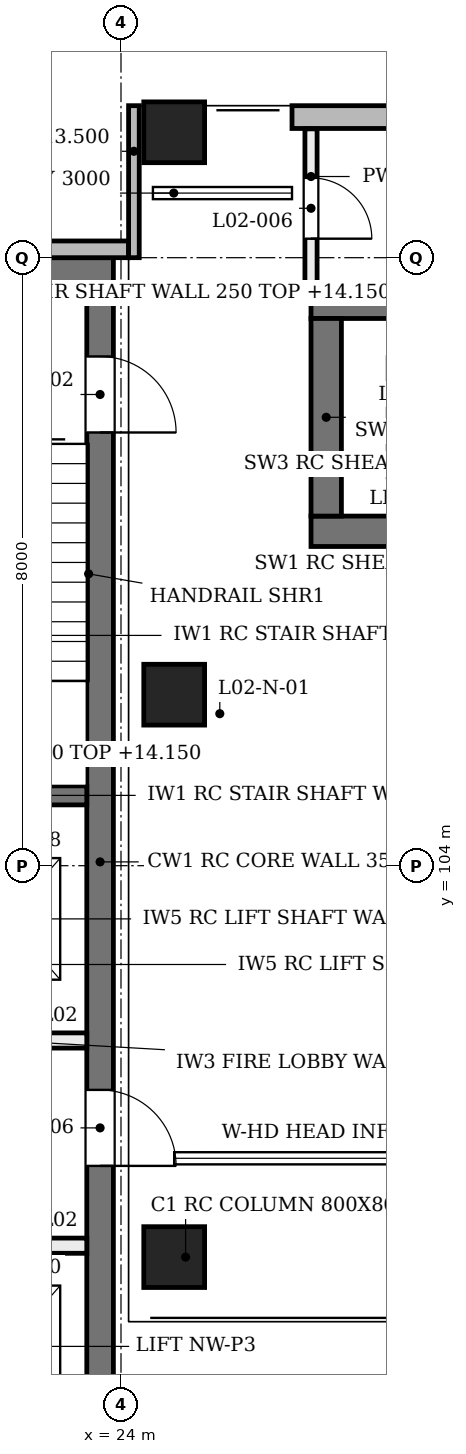
"""IFC4 building model, lengths in metres.
Left out: names, types, materials, properties, quantities, classifications, styles, units other than length and angle.
Written with IfcOpenShell. Run it as: python <this file> out.ifc"""

import sys

from ifc_helpers import new_model, si_unit, direction, frame, frame_2d, origin, origin_2d, place, context, subcontext, project, spatial, rectangle, extrude, element, fill, save


model = new_model("IFC4")
c1 = context("Model", 3, precision=1e-05, world=origin(), true_north=direction((0.0, 1.0)))
c2 = subcontext(c1, "Body", "Model", "MODEL_VIEW")
j1 = project(units=[si_unit("LENGTHUNIT", "METRE"), si_unit("PLANEANGLEUNIT", "RADIAN")], contexts=[c1])
p1 = place(None, origin())
s1 = spatial("IfcSite", under=j1, at=p1, CompositionType="ELEMENT")
p2 = place(p1, origin())
s2 = spatial("IfcBuilding", under=s1, at=p2, CompositionType="ELEMENT")
p3 = place(p2, frame((0.0, 0.0, 9.6)))
s3 = spatial("IfcBuildingStorey", under=s2, at=p3, CompositionType="ELEMENT", Elevation=9.6)
p4 = place(p3, frame((26.5, 108.4, 0.0), z_axis=(0.0, 0.0, 1.0), x_axis=(1.0, 0.0, 0.0)))
e1 = element("IfcWall", 1, at=p4, inside=s3, PredefinedType="SHEAR", context=c2, shape_type="SweptSolid", body=[
    extrude(rectangle(XDim=6.5, YDim=0.4, at=frame_2d((3.25, 0.0))), origin(), (0.0, 0.0, 1.0), 4.58),
])
p5 = place(p4, frame((1.15, 0.0, 0.0)))
e2 = element("IfcOpeningElement", 2, at=p5, cuts=e1, PredefinedType="OPENING", context=c2, shape_type="SweptSolid", body=[
    extrude(rectangle(XDim=1.1, YDim=2.1, at=frame_2d((0.55, 1.05))), frame((0.0, 0.21, 0.0), z_axis=(0.0, -1.0, 0.0), x_axis=(1.0, 0.0, 0.0)), (0.0, 0.0, 1.0), 0.42),
])
p6 = place(p4, frame((3.75, 0.0, 0.0)))
e3 = element("IfcOpeningElement", 3, at=p6, cuts=e1, PredefinedType="OPENING", context=c2, shape_type="SweptSolid", body=[
    extrude(rectangle(XDim=1.1, YDim=2.1, at=frame_2d((0.55, 1.05))), frame((0.0, 0.21, 0.0), z_axis=(0.0, -1.0, 0.0), x_axis=(1.0, 0.0, 0.0)), (0.0, 0.0, 1.0), 0.42),
])
p7 = place(p3, frame((26.5, 111.4, 0.0), z_axis=(0.0, 0.0, 1.0), x_axis=(1.0, 0.0, 0.0)))
e4 = element("IfcWall", 4, at=p7, inside=s3, PredefinedType="SHEAR", context=c2, shape_type="SweptSolid", body=[
    extrude(rectangle(XDim=6.5, YDim=0.4, at=frame_2d((3.25, 0.0))), origin(), (0.0, 0.0, 1.0), 4.58),
])
p8 = place(p3, frame((26.7, 108.6, 0.0), z_axis=(0.0, 0.0, 1.0), x_axis=(0.0, 1.0, 0.0)))
e5 = element("IfcWall", 5, at=p8, inside=s3, PredefinedType="SHEAR", context=c2, shape_type="SweptSolid", body=[
    extrude(rectangle(XDim=2.6, YDim=0.4, at=frame_2d((1.3, 0.0))), origin(), (0.0, 0.0, 1.0), 4.58),
])
p9 = place(p3, frame((16.0, 111.825, 0.0), z_axis=(0.0, 0.0, 1.0), x_axis=(1.0, 0.0, 0.0)))
e6 = element("IfcWall", 6, at=p9, inside=s3, PredefinedType="SHEAR", context=c2, shape_type="SweptSolid", body=[
    extrude(rectangle(XDim=7.9, YDim=0.35, at=frame_2d((3.95, 0.0))), origin(), (0.0, 0.0, 1.0), 4.58),
])
p10 = place(p3, frame((23.725, 96.45, 0.0), z_axis=(0.0, 0.0, 1.0), x_axis=(0.0, 1.0, 0.0)))
e7 = element("IfcWall", 7, at=p10, inside=s3, PredefinedType="SHEAR", context=c2, shape_type="SweptSolid", body=[
    extrude(rectangle(XDim=15.2, YDim=0.35, at=frame_2d((7.6, 0.0))), origin(), (0.0, 0.0, 1.0), 4.58),
])
p11 = place(p10, frame((13.25, 0.0, 0.0)))
e8 = element("IfcOpeningElement", 8, at=p11, cuts=e7, PredefinedType="OPENING", context=c2, shape_type="SweptSolid", body=[
    extrude(rectangle(XDim=1.0, YDim=2.1, at=frame_2d((0.5, 1.05))), frame((0.0, 0.185, 0.0), z_axis=(0.0, -1.0, 0.0), x_axis=(1.0, 0.0, 0.0)), (0.0, 0.0, 1.0), 0.37),
])
p12 = place(p10, frame((3.6, 0.0, 0.0)))
e9 = element("IfcOpeningElement", 9, at=p12, cuts=e7, PredefinedType="OPENING", context=c2, shape_type="SweptSolid", body=[
    extrude(rectangle(XDim=1.0, YDim=2.1, at=frame_2d((0.5, 1.05))), frame((0.0, 0.185, 0.0), z_axis=(0.0, -1.0, 0.0), x_axis=(1.0, 0.0, 0.0)), (0.0, 0.0, 1.0), 0.37),
])
for number, where, z_axis, x_axis in (
    (10, (24.7, 98.6, 0.0), (0.0, 0.204, 0.979), (-1.0, 0.0, 0.0)),
    (11, (24.7, 106.0, 0.0), (0.0, 0.204, 0.979), (-1.0, 0.0, 0.0)),
    (12, (24.7, 113.4, 0.0), (0.0, 0.204, 0.979), (-1.0, 0.0, 0.0)),
):
    element("IfcColumn", number, at=place(p3, frame(where, z_axis=z_axis, x_axis=x_axis)), inside=s3, PredefinedType="COLUMN", context=c2, shape_type="SweptSolid", body=[
        extrude(rectangle(XDim=0.8, YDim=0.8, at=origin_2d()), origin(), (0.0, 0.0, 1.0), 4.903),
    ])
p13 = place(p3, frame((26.25, 113.85, 0.0), z_axis=(0.0, 0.0, 1.0), x_axis=(1.0, 0.0, 0.0)))
e13 = element("IfcWall", 13, at=p13, inside=s3, PredefinedType="SOLIDWALL", context=c2, shape_type="SweptSolid", body=[
    extrude(rectangle(XDim=51.5, YDim=0.3, at=frame_2d((25.75, 0.0))), origin(), (0.0, 0.0, 1.0), 3.9),
])
p14 = place(p3, frame((24.9, 100.15, 4.1), z_axis=(0.0, 0.0, 1.0), x_axis=(1.0, 0.0, 0.0)))
e14 = element("IfcWall", 14, at=p14, inside=s3, PredefinedType="SOLIDWALL", context=c2, shape_type="SweptSolid", body=[
    extrude(rectangle(XDim=6.9, YDim=0.15, at=frame_2d((3.45, 0.0))), origin(), (0.0, 0.0, 1.0), 0.48),
])
p15 = place(p3, frame((15.9, 112.11, 0.0), z_axis=(0.0, 0.0, 1.0), x_axis=(1.0, 0.0, 0.0)))
e15 = element("IfcWall", 15, at=p15, inside=s3, PredefinedType="SOLIDWALL", context=c2, shape_type="SweptSolid", body=[
    extrude(rectangle(XDim=8.2, YDim=0.22, at=frame_2d((4.1, 0.0))), origin(), (0.0, 0.0, 1.0), 3.9),
])
p16 = place(p15, frame((1.108, 0.0, 0.9)))
e16 = element("IfcOpeningElement", 16, at=p16, cuts=e15, PredefinedType="OPENING", context=c2, shape_type="SweptSolid", body=[
    extrude(rectangle(XDim=0.45, YDim=2.6, at=frame_2d((0.225, 1.3))), frame((0.0, 0.12, 0.0), z_axis=(0.0, -1.0, 0.0), x_axis=(1.0, 0.0, 0.0)), (0.0, 0.0, 1.0), 0.24),
])
p17 = place(p15, frame((3.775, 0.0, 0.9)))
e17 = element("IfcOpeningElement", 17, at=p17, cuts=e15, PredefinedType="OPENING", context=c2, shape_type="SweptSolid", body=[
    extrude(rectangle(XDim=0.45, YDim=2.6, at=frame_2d((0.225, 1.3))), frame((0.0, 0.12, 0.0), z_axis=(0.0, -1.0, 0.0), x_axis=(1.0, 0.0, 0.0)), (0.0, 0.0, 1.0), 0.24),
])
p18 = place(p15, frame((6.442, 0.0, 0.9)))
e18 = element("IfcOpeningElement", 18, at=p18, cuts=e15, PredefinedType="OPENING", context=c2, shape_type="SweptSolid", body=[
    extrude(rectangle(XDim=0.45, YDim=2.6, at=frame_2d((0.225, 1.3))), frame((0.0, 0.12, 0.0), z_axis=(0.0, -1.0, 0.0), x_axis=(1.0, 0.0, 0.0)), (0.0, 0.0, 1.0), 0.24),
])
p19 = place(p3, frame((24.17, 112.0, 0.0), z_axis=(0.0, 0.0, 1.0), x_axis=(0.0, 1.0, 0.0)))
e19 = element("IfcWall", 19, at=p19, inside=s3, PredefinedType="SOLIDWALL", context=c2, shape_type="SweptSolid", body=[
    extrude(rectangle(XDim=2.0, YDim=0.14, at=frame_2d((1.0, 0.0))), origin(), (0.0, 0.0, 1.0), 3.9),
])
p20 = place(p3, frame((20.45, 104.925, 0.0), z_axis=(0.0, 0.0, 1.0), x_axis=(1.0, 0.0, 0.0)))
e20 = element("IfcWall", 20, at=p20, inside=s3, PredefinedType="SOLIDWALL", context=c2, shape_type="SweptSolid", body=[
    extrude(rectangle(XDim=3.1, YDim=0.25, at=frame_2d((1.55, 0.0))), origin(), (0.0, 0.0, 1.0), 4.55),
])
p21 = place(p3, frame((16.35, 101.7, 0.0), z_axis=(0.0, 0.0, 1.0), x_axis=(1.0, 0.0, 0.0)))
e21 = element("IfcWall", 21, at=p21, inside=s3, PredefinedType="SOLIDWALL", context=c2, shape_type="SweptSolid", body=[
    extrude(rectangle(XDim=7.2, YDim=0.2, at=frame_2d((3.6, 0.0))), origin(), (0.0, 0.0, 1.0), 4.55),
])
p22 = place(p21, frame((0.5, 0.0, 0.0)))
e22 = element("IfcOpeningElement", 22, at=p22, cuts=e21, PredefinedType="OPENING", context=c2, shape_type="SweptSolid", body=[
    extrude(rectangle(XDim=1.1, YDim=2.1, at=frame_2d((0.55, 1.05))), frame((0.0, 0.11, 0.0), z_axis=(0.0, -1.0, 0.0), x_axis=(1.0, 0.0, 0.0)), (0.0, 0.0, 1.0), 0.22),
])
p23 = place(p21, frame((5.6, 0.0, 0.0)))
e23 = element("IfcOpeningElement", 23, at=p23, cuts=e21, PredefinedType="OPENING", context=c2, shape_type="SweptSolid", body=[
    extrude(rectangle(XDim=1.1, YDim=2.1, at=frame_2d((0.55, 1.05))), frame((0.0, 0.11, 0.0), z_axis=(0.0, -1.0, 0.0), x_axis=(1.0, 0.0, 0.0)), (0.0, 0.0, 1.0), 0.22),
])
p24 = place(p21, frame((3.1, 0.0, 0.0)))
e24 = element("IfcOpeningElement", 24, at=p24, cuts=e21, PredefinedType="OPENING", context=c2, shape_type="SweptSolid", body=[
    extrude(rectangle(XDim=1.0, YDim=2.1, at=frame_2d((0.5, 1.05))), frame((0.0, 0.11, 0.0), z_axis=(0.0, -1.0, 0.0), x_axis=(1.0, 0.0, 0.0)), (0.0, 0.0, 1.0), 0.22),
])
p25 = place(p3, frame((16.35, 99.0, 0.0), z_axis=(0.0, 0.0, 1.0), x_axis=(1.0, 0.0, 0.0)))
e25 = element("IfcWall", 25, at=p25, inside=s3, PredefinedType="SOLIDWALL", context=c2, shape_type="SweptSolid", body=[
    extrude(rectangle(XDim=7.2, YDim=0.2, at=frame_2d((3.6, 0.0))), origin(), (0.0, 0.0, 1.0), 4.55),
])
p26 = place(p25, frame((0.5, 0.0, 0.0)))
e26 = element("IfcOpeningElement", 26, at=p26, cuts=e25, PredefinedType="OPENING", context=c2, shape_type="SweptSolid", body=[
    extrude(rectangle(XDim=1.1, YDim=2.1, at=frame_2d((0.55, 1.05))), frame((0.0, 0.11, 0.0), z_axis=(0.0, -1.0, 0.0), x_axis=(1.0, 0.0, 0.0)), (0.0, 0.0, 1.0), 0.22),
])
p27 = place(p25, frame((5.6, 0.0, 0.0)))
e27 = element("IfcOpeningElement", 27, at=p27, cuts=e25, PredefinedType="OPENING", context=c2, shape_type="SweptSolid", body=[
    extrude(rectangle(XDim=1.1, YDim=2.1, at=frame_2d((0.55, 1.05))), frame((0.0, 0.11, 0.0), z_axis=(0.0, -1.0, 0.0), x_axis=(1.0, 0.0, 0.0)), (0.0, 0.0, 1.0), 0.22),
])
p28 = place(p25, frame((3.1, 0.0, 0.0)))
e28 = element("IfcOpeningElement", 28, at=p28, cuts=e25, PredefinedType="OPENING", context=c2, shape_type="SweptSolid", body=[
    extrude(rectangle(XDim=1.0, YDim=2.1, at=frame_2d((0.5, 1.05))), frame((0.0, 0.11, 0.0), z_axis=(0.0, -1.0, 0.0), x_axis=(1.0, 0.0, 0.0)), (0.0, 0.0, 1.0), 0.22),
])
p29 = place(p3, frame((26.5, 111.605, 0.0), z_axis=(0.0, 0.0, 1.0), x_axis=(0.0, 1.0, 0.0)))
e29 = element("IfcWall", 29, at=p29, inside=s3, PredefinedType="PARTITIONING", context=c2, shape_type="SweptSolid", body=[
    extrude(rectangle(XDim=2.09, YDim=0.16, at=frame_2d((1.045, 0.0))), origin(), (0.0, 0.0, 1.0), 4.56),
])
p30 = place(p29, frame((0.645, 0.0, 0.0)))
e30 = element("IfcOpeningElement", 30, at=p30, cuts=e29, PredefinedType="OPENING", context=c2, shape_type="SweptSolid", body=[
    extrude(rectangle(XDim=0.8, YDim=2.1, at=frame_2d((0.4, 1.05))), frame((0.0, 0.09, 0.0), z_axis=(0.0, -1.0, 0.0), x_axis=(1.0, 0.0, 0.0)), (0.0, 0.0, 1.0), 0.18),
])
p31 = place(p11, frame((1.0, 0.0, 0.0), z_axis=(0.0, 0.0, 1.0), x_axis=(-1.0, 0.0, 0.0)))
e31 = element("IfcDoor", 31, at=p31, inside=s3, OperationType="SINGLE_SWING_LEFT", PredefinedType="DOOR", context=c2, shape_type="SweptSolid", body=[
    extrude(rectangle(XDim=1.0, YDim=2.1, at=frame_2d((0.5, 1.05))), frame((0.0, 0.025, 0.0), z_axis=(0.0, -1.0, 0.0), x_axis=(1.0, 0.0, 0.0)), (0.0, 0.0, 1.0), 0.05),
])
fill(e8, e31)
p32 = place(p12, frame((1.0, 0.0, 0.0), z_axis=(0.0, 0.0, 1.0), x_axis=(-1.0, 0.0, 0.0)))
e32 = element("IfcDoor", 32, at=p32, inside=s3, OperationType="SINGLE_SWING_LEFT", PredefinedType="DOOR", context=c2, shape_type="SweptSolid", body=[
    extrude(rectangle(XDim=1.0, YDim=2.1, at=frame_2d((0.5, 1.05))), frame((0.0, 0.025, 0.0), z_axis=(0.0, -1.0, 0.0), x_axis=(1.0, 0.0, 0.0)), (0.0, 0.0, 1.0), 0.05),
])
fill(e9, e32)
p33 = place(p30, frame((0.8, 0.0, 0.0), z_axis=(0.0, 0.0, 1.0), x_axis=(-1.0, 0.0, 0.0)))
e33 = element("IfcDoor", 33, at=p33, inside=s3, OperationType="SINGLE_SWING_LEFT", PredefinedType="DOOR", context=c2, shape_type="SweptSolid", body=[
    extrude(rectangle(XDim=0.8, YDim=2.1, at=frame_2d((0.4, 1.05))), frame((0.0, 0.025, 0.0), z_axis=(0.0, -1.0, 0.0), x_axis=(1.0, 0.0, 0.0)), (0.0, 0.0, 1.0), 0.05),
])
fill(e30, e33)
save(model, sys.argv[1])
